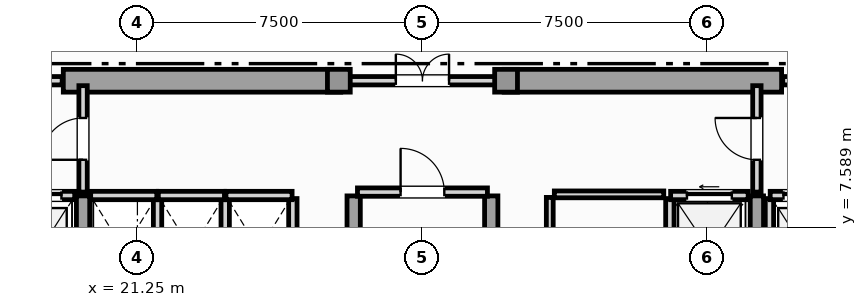
"""IFC4 building model, lengths in metres.
Left out: names, types, materials, properties, quantities, classifications, styles, units other than length and angle.
Written with IfcOpenShell. Run it as: python <this file> out.ifc"""

import sys

from ifc_helpers import new_model, si_unit, direction, frame, frame_2d, origin, origin_2d, place, context, subcontext, project, spatial, rectangle, extrude, element, fill, save


model = new_model("IFC4")
c1 = context("Model", 3, precision=1e-05, world=origin(), true_north=direction((0.0, 1.0)))
c2 = subcontext(c1, "Body", "Model", "MODEL_VIEW")
j1 = project(units=[si_unit("LENGTHUNIT", "METRE"), si_unit("PLANEANGLEUNIT", "RADIAN")], contexts=[c1])
p1 = place(None, origin())
s1 = spatial("IfcSite", under=j1, at=p1, CompositionType="ELEMENT")
p2 = place(p1, origin())
s2 = spatial("IfcBuilding", under=s1, at=p2, CompositionType="ELEMENT")
p3 = place(p2, frame((0.0, 0.0, 231.1)))
s3 = spatial("IfcBuildingStorey", under=s2, at=p3, CompositionType="ELEMENT", Elevation=231.1)
for number, where, z_axis, x_axis in (
    (1, (19.3, 11.45, 0.0), (0.0, 0.0, 1.0), (1.0, 0.0, 0.0)),
    (2, (30.9, 11.45, 0.0), (0.0, 0.0, 1.0), (1.0, 0.0, 0.0)),
):
    element("IfcWall", number, at=place(p3, frame(where, z_axis=z_axis, x_axis=x_axis)), inside=s3, PredefinedType="SHEAR", context=c2, shape_type="SweptSolid", body=[
        extrude(rectangle(XDim=7.3, YDim=0.6, at=frame_2d((3.65, 0.0))), origin(), (0.0, 0.0, 1.0), 3.63),
    ])
for number, where, z_axis, x_axis in (
    (3, (19.82, 0.92, 0.0), (0.0, 0.0, 1.0), (0.0, 1.0, 0.0)),
    (4, (26.94, 0.92, 0.0), (0.0, 0.0, 1.0), (0.0, 1.0, 0.0)),
    (5, (30.56, 0.92, 0.0), (0.0, 0.0, 1.0), (0.0, 1.0, 0.0)),
    (6, (37.55, 0.92, 0.0), (0.0, 0.0, 1.0), (0.0, 1.0, 0.0)),
):
    element("IfcWall", number, at=place(p3, frame(where, z_axis=z_axis, x_axis=x_axis)), inside=s3, PredefinedType="SHEAR", context=c2, shape_type="SweptSolid", body=[
        extrude(rectangle(XDim=7.5, YDim=0.35, at=frame_2d((3.75, 0.0))), origin(), (0.0, 0.0, 1.0), 3.63),
    ])
for number, where, z_axis, x_axis in (
    (7, (26.55, 11.45, 0.0), (0.0, 0.0, 1.0), (1.0, 0.0, 0.0)),
    (8, (30.95, 11.45, 0.0), (0.0, 0.0, 1.0), (1.0, 0.0, 0.0)),
):
    element("IfcColumn", number, at=place(p3, frame(where, z_axis=z_axis, x_axis=x_axis)), inside=s3, PredefinedType="COLUMN", context=c2, shape_type="SweptSolid", body=[
        extrude(rectangle(XDim=0.6, YDim=0.6, at=origin_2d()), origin(), (0.0, 0.0, 1.0), 3.85),
    ])
p4 = place(p3, frame((17.78, 8.43, 0.0), z_axis=(0.0, 0.0, 1.0), x_axis=(1.0, 0.0, 0.0)))
e9 = element("IfcWall", 9, at=p4, inside=s3, PredefinedType="SOLIDWALL", context=c2, shape_type="SweptSolid", body=[
    extrude(rectangle(XDim=1.82, YDim=0.22, at=frame_2d((0.91, 0.0))), origin(), (0.0, 0.0, 1.0), 3.63),
])
p5 = place(p4, frame((0.35, 0.0, 0.0)))
e10 = element("IfcOpeningElement", 10, at=p5, cuts=e9, PredefinedType="OPENING", context=c2, shape_type="SweptSolid", body=[
    extrude(rectangle(XDim=1.12, YDim=2.25, at=frame_2d((0.56, 1.125))), frame((0.0, 0.12, 0.0), z_axis=(0.0, -1.0, 0.0), x_axis=(1.0, 0.0, 0.0)), (0.0, 0.0, 1.0), 0.24),
])
p6 = place(p3, frame((37.88, 5.65, 0.0), z_axis=(0.0, 0.0, 1.0), x_axis=(0.0, 1.0, 0.0)))
e11 = element("IfcWall", 11, at=p6, inside=s3, PredefinedType="SOLIDWALL", context=c2, shape_type="SweptSolid", body=[
    extrude(rectangle(XDim=2.7, YDim=0.22, at=frame_2d((1.35, 0.0))), origin(), (0.0, 0.0, 1.0), 3.63),
])
p7 = place(p3, frame((37.9, 8.43, 0.0), z_axis=(0.0, 0.0, 1.0), x_axis=(1.0, 0.0, 0.0)))
e12 = element("IfcWall", 12, at=p7, inside=s3, PredefinedType="SOLIDWALL", context=c2, shape_type="SweptSolid", body=[
    extrude(rectangle(XDim=1.82, YDim=0.22, at=frame_2d((0.91, 0.0))), origin(), (0.0, 0.0, 1.0), 3.63),
])
p8 = place(p7, frame((0.35, 0.0, 0.0)))
e13 = element("IfcOpeningElement", 13, at=p8, cuts=e12, PredefinedType="OPENING", context=c2, shape_type="SweptSolid", body=[
    extrude(rectangle(XDim=1.12, YDim=2.25, at=frame_2d((0.56, 1.125))), frame((0.0, 0.12, 0.0), z_axis=(0.0, -1.0, 0.0), x_axis=(1.0, 0.0, 0.0)), (0.0, 0.0, 1.0), 0.24),
])
p9 = place(p3, frame((35.26, 5.65, 0.0), z_axis=(0.0, 0.0, 1.0), x_axis=(0.0, 1.0, 0.0)))
e14 = element("IfcWall", 14, at=p9, inside=s3, PredefinedType="SOLIDWALL", context=c2, shape_type="SweptSolid", body=[
    extrude(rectangle(XDim=2.7, YDim=0.22, at=frame_2d((1.35, 0.0))), origin(), (0.0, 0.0, 1.0), 3.63),
])
p10 = place(p3, frame((35.28, 8.43, 0.0), z_axis=(0.0, 0.0, 1.0), x_axis=(1.0, 0.0, 0.0)))
e15 = element("IfcWall", 15, at=p10, inside=s3, PredefinedType="SOLIDWALL", context=c2, shape_type="SweptSolid", body=[
    extrude(rectangle(XDim=2.04, YDim=0.22, at=frame_2d((1.02, 0.0))), origin(), (0.0, 0.0, 1.0), 3.63),
])
p11 = place(p10, frame((0.43, 0.0, 0.0)))
e16 = element("IfcOpeningElement", 16, at=p11, cuts=e15, PredefinedType="OPENING", context=c2, shape_type="SweptSolid", body=[
    extrude(rectangle(XDim=1.18, YDim=2.2, at=frame_2d((0.59, 1.1))), frame((0.0, 0.12, 0.0), z_axis=(0.0, -1.0, 0.0), x_axis=(1.0, 0.0, 0.0)), (0.0, 0.0, 1.0), 0.24),
])
p12 = place(p3, frame((21.78, 5.65, 0.0), z_axis=(0.0, 0.0, 1.0), x_axis=(0.0, 1.0, 0.0)))
e17 = element("IfcWall", 17, at=p12, inside=s3, PredefinedType="SOLIDWALL", context=c2, shape_type="SweptSolid", body=[
    extrude(rectangle(XDim=2.7, YDim=0.22, at=frame_2d((1.35, 0.0))), origin(), (0.0, 0.0, 1.0), 3.63),
])
p13 = place(p3, frame((20.02, 8.43, 0.0), z_axis=(0.0, 0.0, 1.0), x_axis=(1.0, 0.0, 0.0)))
e18 = element("IfcWall", 18, at=p13, inside=s3, PredefinedType="SOLIDWALL", context=c2, shape_type="SweptSolid", body=[
    extrude(rectangle(XDim=1.74, YDim=0.22, at=frame_2d((0.87, 0.0))), origin(), (0.0, 0.0, 1.0), 3.63),
])
p14 = place(p3, frame((23.56, 5.65, 0.0), z_axis=(0.0, 0.0, 1.0), x_axis=(0.0, 1.0, 0.0)))
e19 = element("IfcWall", 19, at=p14, inside=s3, PredefinedType="SOLIDWALL", context=c2, shape_type="SweptSolid", body=[
    extrude(rectangle(XDim=2.7, YDim=0.22, at=frame_2d((1.35, 0.0))), origin(), (0.0, 0.0, 1.0), 3.63),
])
p15 = place(p3, frame((21.8, 8.43, 0.0), z_axis=(0.0, 0.0, 1.0), x_axis=(1.0, 0.0, 0.0)))
e20 = element("IfcWall", 20, at=p15, inside=s3, PredefinedType="SOLIDWALL", context=c2, shape_type="SweptSolid", body=[
    extrude(rectangle(XDim=1.74, YDim=0.22, at=frame_2d((0.87, 0.0))), origin(), (0.0, 0.0, 1.0), 3.63),
])
p16 = place(p3, frame((25.34, 5.65, 0.0), z_axis=(0.0, 0.0, 1.0), x_axis=(0.0, 1.0, 0.0)))
e21 = element("IfcWall", 21, at=p16, inside=s3, PredefinedType="SOLIDWALL", context=c2, shape_type="SweptSolid", body=[
    extrude(rectangle(XDim=2.7, YDim=0.22, at=frame_2d((1.35, 0.0))), origin(), (0.0, 0.0, 1.0), 3.63),
])
p17 = place(p3, frame((23.58, 8.43, 0.0), z_axis=(0.0, 0.0, 1.0), x_axis=(1.0, 0.0, 0.0)))
e22 = element("IfcWall", 22, at=p17, inside=s3, PredefinedType="SOLIDWALL", context=c2, shape_type="SweptSolid", body=[
    extrude(rectangle(XDim=1.74, YDim=0.22, at=frame_2d((0.87, 0.0))), origin(), (0.0, 0.0, 1.0), 3.63),
])
p18 = place(p3, frame((27.04, 8.52, 0.0), z_axis=(0.0, 0.0, 1.0), x_axis=(1.0, 0.0, 0.0)))
e23 = element("IfcWall", 23, at=p18, inside=s3, PredefinedType="SOLIDWALL", context=c2, shape_type="SweptSolid", body=[
    extrude(rectangle(XDim=3.42, YDim=0.22, at=frame_2d((1.71, 0.0))), origin(), (0.0, 0.0, 1.0), 3.63),
])
p19 = place(p18, frame((1.135, 0.0, 0.0)))
e24 = element("IfcOpeningElement", 24, at=p19, cuts=e23, PredefinedType="OPENING", context=c2, shape_type="SweptSolid", body=[
    extrude(rectangle(XDim=1.15, YDim=2.2, at=frame_2d((0.575, 1.1))), frame((0.0, 0.12, 0.0), z_axis=(0.0, -1.0, 0.0), x_axis=(1.0, 0.0, 0.0)), (0.0, 0.0, 1.0), 0.24),
])
p20 = place(p3, frame((19.82, 8.52, 0.0), z_axis=(0.0, 0.0, 1.0), x_axis=(0.0, 1.0, 0.0)))
e25 = element("IfcWall", 25, at=p20, inside=s3, PredefinedType="SOLIDWALL", context=c2, shape_type="SweptSolid", body=[
    extrude(rectangle(XDim=2.8, YDim=0.22, at=frame_2d((1.4, 0.0))), origin(), (0.0, 0.0, 1.0), 3.085),
])
p21 = place(p20, frame((0.85, 0.0, 0.0)))
e26 = element("IfcOpeningElement", 26, at=p21, cuts=e25, PredefinedType="OPENING", context=c2, shape_type="SweptSolid", body=[
    extrude(rectangle(XDim=1.1, YDim=2.2, at=frame_2d((0.55, 1.1))), frame((0.0, 0.12, 0.0), z_axis=(0.0, -1.0, 0.0), x_axis=(1.0, 0.0, 0.0)), (0.0, 0.0, 1.0), 0.24),
])
p22 = place(p3, frame((37.55, 8.52, 0.0), z_axis=(0.0, 0.0, 1.0), x_axis=(0.0, 1.0, 0.0)))
e27 = element("IfcWall", 27, at=p22, inside=s3, PredefinedType="SOLIDWALL", context=c2, shape_type="SweptSolid", body=[
    extrude(rectangle(XDim=2.8, YDim=0.22, at=frame_2d((1.4, 0.0))), origin(), (0.0, 0.0, 1.0), 3.085),
])
p23 = place(p22, frame((0.85, 0.0, 0.0)))
e28 = element("IfcOpeningElement", 28, at=p23, cuts=e27, PredefinedType="OPENING", context=c2, shape_type="SweptSolid", body=[
    extrude(rectangle(XDim=1.1, YDim=2.2, at=frame_2d((0.55, 1.1))), frame((0.0, 0.12, 0.0), z_axis=(0.0, -1.0, 0.0), x_axis=(1.0, 0.0, 0.0)), (0.0, 0.0, 1.0), 0.24),
])
p24 = place(p3, frame((16.23, 11.45, 0.0), z_axis=(0.0, 0.0, 1.0), x_axis=(1.0, 0.0, 0.0)))
e29 = element("IfcWall", 29, at=p24, inside=s3, PredefinedType="SOLIDWALL", context=c2, shape_type="SweptSolid", body=[
    extrude(rectangle(XDim=3.04, YDim=0.22, at=frame_2d((1.52, 0.0))), origin(), (0.0, 0.0, 1.0), 3.63),
])
p25 = place(p24, frame((0.97, 0.0, 0.0)))
e30 = element("IfcOpeningElement", 30, at=p25, cuts=e29, PredefinedType="OPENING", context=c2, shape_type="SweptSolid", body=[
    extrude(rectangle(XDim=1.1, YDim=2.2, at=frame_2d((0.55, 1.1))), frame((0.0, 0.12, 0.0), z_axis=(0.0, -1.0, 0.0), x_axis=(1.0, 0.0, 0.0)), (0.0, 0.0, 1.0), 0.24),
])
p26 = place(p3, frame((26.63, 11.45, 0.0), z_axis=(0.0, 0.0, 1.0), x_axis=(1.0, 0.0, 0.0)))
e31 = element("IfcWall", 31, at=p26, inside=s3, PredefinedType="SOLIDWALL", context=c2, shape_type="SweptSolid", body=[
    extrude(rectangle(XDim=4.24, YDim=0.22, at=frame_2d((2.12, 0.0))), origin(), (0.0, 0.0, 1.0), 3.63),
])
p27 = place(p26, frame((1.42, 0.0, 0.0)))
e32 = element("IfcOpeningElement", 32, at=p27, cuts=e31, PredefinedType="OPENING", context=c2, shape_type="SweptSolid", body=[
    extrude(rectangle(XDim=1.4, YDim=2.2, at=frame_2d((0.7, 1.1))), frame((0.0, 0.12, 0.0), z_axis=(0.0, -1.0, 0.0), x_axis=(1.0, 0.0, 0.0)), (0.0, 0.0, 1.0), 0.24),
])
p28 = place(p3, frame((38.23, 11.45, 0.0), z_axis=(0.0, 0.0, 1.0), x_axis=(1.0, 0.0, 0.0)))
e33 = element("IfcWall", 33, at=p28, inside=s3, PredefinedType="SOLIDWALL", context=c2, shape_type="SweptSolid", body=[
    extrude(rectangle(XDim=3.04, YDim=0.22, at=frame_2d((1.52, 0.0))), origin(), (0.0, 0.0, 1.0), 3.63),
])
p29 = place(p28, frame((0.97, 0.0, 0.0)))
e34 = element("IfcOpeningElement", 34, at=p29, cuts=e33, PredefinedType="OPENING", context=c2, shape_type="SweptSolid", body=[
    extrude(rectangle(XDim=1.1, YDim=2.2, at=frame_2d((0.55, 1.1))), frame((0.0, 0.12, 0.0), z_axis=(0.0, -1.0, 0.0), x_axis=(1.0, 0.0, 0.0)), (0.0, 0.0, 1.0), 0.24),
])
p30 = place(p3, frame((32.1, 5.65, 0.0), z_axis=(0.0, 0.0, 1.0), x_axis=(0.0, 1.0, 0.0)))
e35 = element("IfcWall", 35, at=p30, inside=s3, PredefinedType="PARTITIONING", context=c2, shape_type="SweptSolid", body=[
    extrude(rectangle(XDim=2.73, YDim=0.18, at=frame_2d((1.365, 0.0))), origin(), (0.0, 0.0, 1.0), 3.63),
])
p31 = place(p30, frame((0.925, 0.0, 0.0)))
e36 = element("IfcOpeningElement", 36, at=p31, cuts=e35, PredefinedType="OPENING", context=c2, shape_type="SweptSolid", body=[
    extrude(rectangle(XDim=0.88, YDim=2.05, at=frame_2d((0.44, 1.025))), frame((0.0, 0.1, 0.0), z_axis=(0.0, -1.0, 0.0), x_axis=(1.0, 0.0, 0.0)), (0.0, 0.0, 1.0), 0.2),
])
p32 = place(p3, frame((32.22, 8.46, 0.0), z_axis=(0.0, 0.0, 1.0), x_axis=(1.0, 0.0, 0.0)))
e37 = element("IfcWall", 37, at=p32, inside=s3, PredefinedType="PARTITIONING", context=c2, shape_type="SweptSolid", body=[
    extrude(rectangle(XDim=2.88, YDim=0.18, at=frame_2d((1.44, 0.0))), origin(), (0.0, 0.0, 1.0), 3.63),
])
p33 = place(p5, origin())
e38 = element("IfcDoor", 38, at=p33, inside=s3, OperationType="SLIDING_TO_LEFT", PredefinedType="DOOR", context=c2, shape_type="SweptSolid", body=[
    extrude(rectangle(XDim=1.12, YDim=2.25, at=frame_2d((0.56, 1.125))), frame((0.0, 0.025, 0.0), z_axis=(0.0, -1.0, 0.0), x_axis=(1.0, 0.0, 0.0)), (0.0, 0.0, 1.0), 0.05),
])
fill(e10, e38)
p34 = place(p8, origin())
e39 = element("IfcDoor", 39, at=p34, inside=s3, OperationType="SLIDING_TO_RIGHT", PredefinedType="DOOR", context=c2, shape_type="SweptSolid", body=[
    extrude(rectangle(XDim=1.12, YDim=2.25, at=frame_2d((0.56, 1.125))), frame((0.0, 0.025, 0.0), z_axis=(0.0, -1.0, 0.0), x_axis=(1.0, 0.0, 0.0)), (0.0, 0.0, 1.0), 0.05),
])
fill(e13, e39)
p35 = place(p11, origin())
e40 = element("IfcDoor", 40, at=p35, inside=s3, OperationType="SLIDING_TO_LEFT", PredefinedType="DOOR", context=c2, shape_type="SweptSolid", body=[
    extrude(rectangle(XDim=1.18, YDim=2.2, at=frame_2d((0.59, 1.1))), frame((0.0, 0.025, 0.0), z_axis=(0.0, -1.0, 0.0), x_axis=(1.0, 0.0, 0.0)), (0.0, 0.0, 1.0), 0.05),
])
fill(e16, e40)
p36 = place(p19, origin())
e41 = element("IfcDoor", 41, at=p36, inside=s3, OperationType="SINGLE_SWING_LEFT", PredefinedType="DOOR", context=c2, shape_type="SweptSolid", body=[
    extrude(rectangle(XDim=1.15, YDim=2.2, at=frame_2d((0.575, 1.1))), frame((0.0, 0.025, 0.0), z_axis=(0.0, -1.0, 0.0), x_axis=(1.0, 0.0, 0.0)), (0.0, 0.0, 1.0), 0.05),
])
fill(e24, e41)
p37 = place(p21, origin())
e42 = element("IfcDoor", 42, at=p37, inside=s3, OperationType="SINGLE_SWING_LEFT", PredefinedType="DOOR", context=c2, shape_type="SweptSolid", body=[
    extrude(rectangle(XDim=1.1, YDim=2.2, at=frame_2d((0.55, 1.1))), frame((0.0, 0.025, 0.0), z_axis=(0.0, -1.0, 0.0), x_axis=(1.0, 0.0, 0.0)), (0.0, 0.0, 1.0), 0.05),
])
fill(e26, e42)
p38 = place(p23, origin())
e43 = element("IfcDoor", 43, at=p38, inside=s3, OperationType="SINGLE_SWING_RIGHT", PredefinedType="DOOR", context=c2, shape_type="SweptSolid", body=[
    extrude(rectangle(XDim=1.1, YDim=2.2, at=frame_2d((0.55, 1.1))), frame((0.0, 0.025, 0.0), z_axis=(0.0, -1.0, 0.0), x_axis=(1.0, 0.0, 0.0)), (0.0, 0.0, 1.0), 0.05),
])
fill(e28, e43)
p39 = place(p27, origin())
e44 = element("IfcDoor", 44, at=p39, inside=s3, OperationType="DOUBLE_DOOR_SINGLE_SWING", PredefinedType="DOOR", context=c2, shape_type="SweptSolid", body=[
    extrude(rectangle(XDim=1.4, YDim=2.2, at=frame_2d((0.7, 1.1))), frame((0.0, 0.025, 0.0), z_axis=(0.0, -1.0, 0.0), x_axis=(1.0, 0.0, 0.0)), (0.0, 0.0, 1.0), 0.05),
])
fill(e32, e44)
save(model, sys.argv[1])
